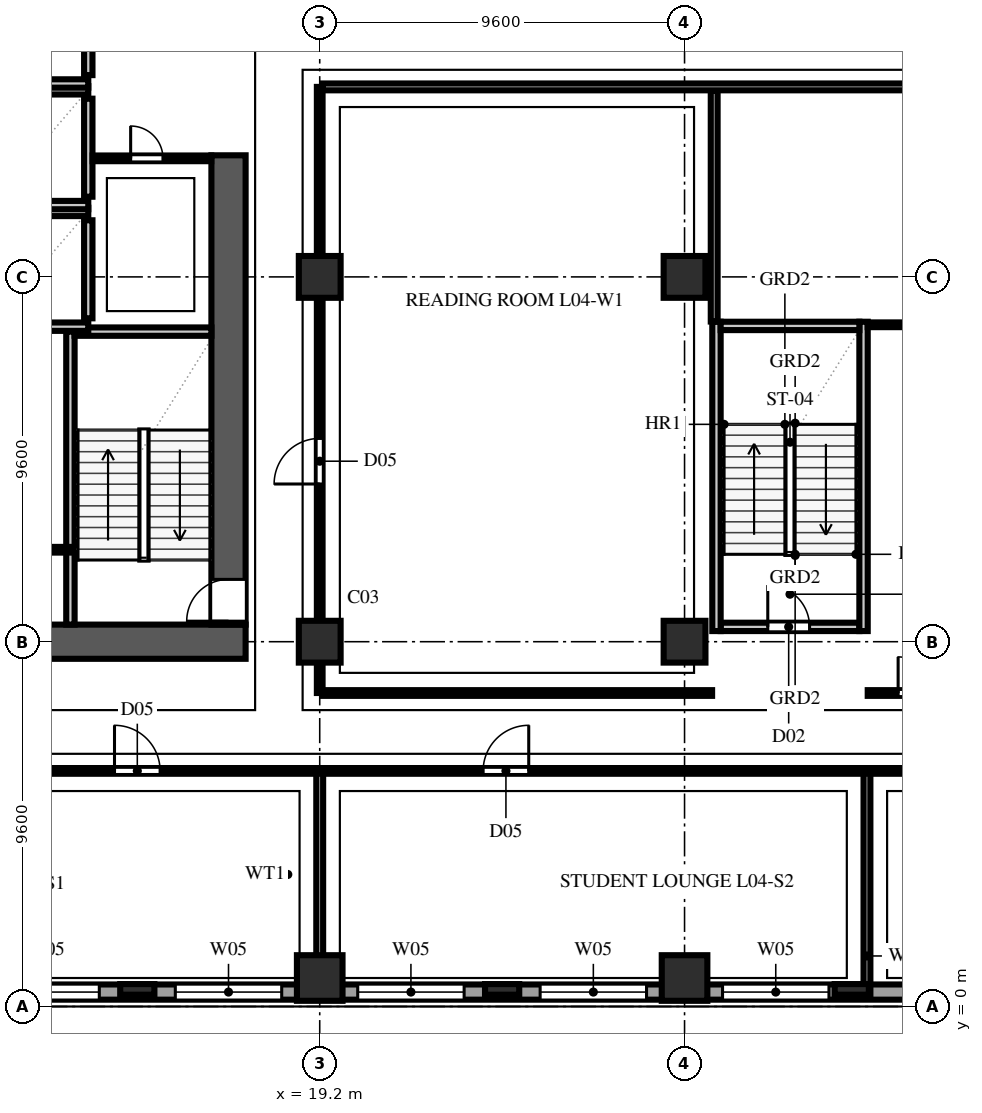
"""IFC4 building model, lengths in metres.
Left out: names, types, materials, properties, quantities, classifications, styles, units other than length and angle.
Written with IfcOpenShell. Run it as: python <this file> out.ifc"""

import sys

from ifc_helpers import new_model, si_unit, direction, frame, frame_2d, origin, origin_2d, place, context, subcontext, project, spatial, rectangle, extrude, element, fill, save


model = new_model("IFC4")
c1 = context("Model", 3, precision=1e-05, world=origin(), true_north=direction((0.0, 1.0)))
c2 = subcontext(c1, "Body", "Model", "MODEL_VIEW")
j1 = project(units=[si_unit("LENGTHUNIT", "METRE"), si_unit("PLANEANGLEUNIT", "RADIAN")], contexts=[c1])
p1 = place(None, origin())
s1 = spatial("IfcSite", under=j1, at=p1, CompositionType="ELEMENT")
p2 = place(p1, origin())
s2 = spatial("IfcBuilding", under=s1, at=p2, CompositionType="ELEMENT")
p3 = place(p2, frame((0.0, 0.0, 19.6)))
s3 = spatial("IfcBuildingStorey", under=s2, at=p3, CompositionType="ELEMENT", Elevation=19.6)
p4 = place(p3, frame((2.65, 9.6, 0.0), z_axis=(0.0, 0.0, 1.0), x_axis=(1.0, 0.0, 0.0)))
e1 = element("IfcWall", 1, at=p4, inside=s3, PredefinedType="SHEAR", context=c2, shape_type="SweptSolid", body=[
    extrude(rectangle(XDim=14.6, YDim=0.9, at=frame_2d((7.3, 0.0))), origin(), (0.0, 0.0, 1.0), 4.34),
])
p5 = place(p3, frame((16.8, 10.05, 0.0), z_axis=(0.0, 0.0, 1.0), x_axis=(0.0, 1.0, 0.0)))
e2 = element("IfcWall", 2, at=p5, inside=s3, PredefinedType="SHEAR", context=c2, shape_type="SweptSolid", body=[
    extrude(rectangle(XDim=12.35, YDim=0.9, at=frame_2d((6.175, 0.0))), origin(), (0.0, 0.0, 1.0), 4.34),
])
p6 = place(p5, frame((0.09, 0.0, 0.0)))
e3 = element("IfcOpeningElement", 3, at=p6, cuts=e2, PredefinedType="OPENING", context=c2, shape_type="SweptSolid", body=[
    extrude(rectangle(XDim=1.1, YDim=2.2, at=frame_2d((0.55, 1.1))), frame((0.0, 0.462, 0.0), z_axis=(0.0, -1.0, 0.0), x_axis=(1.0, 0.0, 0.0)), (0.0, 0.0, 1.0), 0.924),
])
p7 = place(p3, frame((19.2, 0.75, 0.0), z_axis=(0.0, 0.0, 1.0), x_axis=(1.0, 0.0, 0.0)))
e4 = element("IfcColumn", 4, at=p7, inside=s3, PredefinedType="COLUMN", context=c2, shape_type="SweptSolid", body=[
    extrude(rectangle(XDim=1.2, YDim=1.2, at=origin_2d()), origin(), (0.0, 0.0, 1.0), 4.6),
])
for number, where, z_axis, x_axis in (
    (5, (19.2, 9.6, 0.0), (0.0, 0.0, 1.0), (1.0, 0.0, 0.0)),
    (6, (19.2, 19.2, 0.0), (0.0, 0.0, 1.0), (1.0, 0.0, 0.0)),
):
    element("IfcColumn", number, at=place(p3, frame(where, z_axis=z_axis, x_axis=x_axis)), inside=s3, PredefinedType="COLUMN", context=c2, shape_type="SweptSolid", body=[
        extrude(rectangle(XDim=1.1, YDim=1.1, at=origin_2d()), origin(), (0.0, 0.0, 1.0), 4.6),
    ])
p8 = place(p3, frame((28.8, 0.75, 0.0), z_axis=(0.0, 0.0, 1.0), x_axis=(1.0, 0.0, 0.0)))
e7 = element("IfcColumn", 7, at=p8, inside=s3, PredefinedType="COLUMN", context=c2, shape_type="SweptSolid", body=[
    extrude(rectangle(XDim=1.2, YDim=1.2, at=origin_2d()), origin(), (0.0, 0.0, 1.0), 4.6),
])
for number, where, z_axis, x_axis in (
    (8, (28.8, 9.6, 0.0), (0.0, 0.0, 1.0), (1.0, 0.0, 0.0)),
    (9, (28.8, 19.2, 0.0), (0.0, 0.0, 1.0), (1.0, 0.0, 0.0)),
):
    element("IfcColumn", number, at=place(p3, frame(where, z_axis=z_axis, x_axis=x_axis)), inside=s3, PredefinedType="COLUMN", context=c2, shape_type="SweptSolid", body=[
        extrude(rectangle(XDim=1.1, YDim=1.1, at=origin_2d()), origin(), (0.0, 0.0, 1.0), 4.6),
    ])
for number, where, z_axis, x_axis in (
    (10, (14.4, 0.45, 0.0), (0.0, 0.0, 1.0), (1.0, 0.0, 0.0)),
    (11, (24.0, 0.45, 0.0), (0.0, 0.0, 1.0), (1.0, 0.0, 0.0)),
    (12, (33.2, 0.45, 0.0), (0.0, 0.0, 1.0), (1.0, 0.0, 0.0)),
):
    element("IfcColumn", number, at=place(p3, frame(where, z_axis=z_axis, x_axis=x_axis)), inside=s3, PredefinedType="PILASTER", context=c2, shape_type="SweptSolid", body=[
        extrude(rectangle(XDim=0.9, YDim=0.28, at=origin_2d()), origin(), (0.0, 0.0, 1.0), 4.6),
    ])
p9 = place(p3, frame((1.84, 0.38, 0.0), z_axis=(0.0, 0.0, 1.0), x_axis=(1.0, 0.0, 0.0)))
e13 = element("IfcWall", 13, at=p9, inside=s3, PredefinedType="SOLIDWALL", context=c2, shape_type="SweptSolid", body=[
    extrude(rectangle(XDim=63.52, YDim=0.4, at=frame_2d((31.76, 0.0))), origin(), (0.0, 0.0, 1.0), 4.34),
])
p10 = place(p9, frame((3.96, 0.0, 0.75)))
e14 = element("IfcOpeningElement", 14, at=p10, cuts=e13, PredefinedType="OPENING", context=c2, shape_type="SweptSolid", body=[
    extrude(rectangle(XDim=2.8, YDim=2.3, at=frame_2d((1.4, 1.15))), frame((0.0, 0.212, 0.0), z_axis=(0.0, -1.0, 0.0), x_axis=(1.0, 0.0, 0.0)), (0.0, 0.0, 1.0), 0.424),
])
p11 = place(p9, frame((8.76, 0.0, 0.75)))
e15 = element("IfcOpeningElement", 15, at=p11, cuts=e13, PredefinedType="OPENING", context=c2, shape_type="SweptSolid", body=[
    extrude(rectangle(XDim=2.8, YDim=2.3, at=frame_2d((1.4, 1.15))), frame((0.0, 0.212, 0.0), z_axis=(0.0, -1.0, 0.0), x_axis=(1.0, 0.0, 0.0)), (0.0, 0.0, 1.0), 0.424),
])
p12 = place(p9, frame((13.56, 0.0, 0.75)))
e16 = element("IfcOpeningElement", 16, at=p12, cuts=e13, PredefinedType="OPENING", context=c2, shape_type="SweptSolid", body=[
    extrude(rectangle(XDim=2.8, YDim=2.3, at=frame_2d((1.4, 1.15))), frame((0.0, 0.212, 0.0), z_axis=(0.0, -1.0, 0.0), x_axis=(1.0, 0.0, 0.0)), (0.0, 0.0, 1.0), 0.424),
])
p13 = place(p9, frame((18.36, 0.0, 0.75)))
e17 = element("IfcOpeningElement", 17, at=p13, cuts=e13, PredefinedType="OPENING", context=c2, shape_type="SweptSolid", body=[
    extrude(rectangle(XDim=2.8, YDim=2.3, at=frame_2d((1.4, 1.15))), frame((0.0, 0.212, 0.0), z_axis=(0.0, -1.0, 0.0), x_axis=(1.0, 0.0, 0.0)), (0.0, 0.0, 1.0), 0.424),
])
p14 = place(p9, frame((23.16, 0.0, 0.75)))
e18 = element("IfcOpeningElement", 18, at=p14, cuts=e13, PredefinedType="OPENING", context=c2, shape_type="SweptSolid", body=[
    extrude(rectangle(XDim=2.8, YDim=2.3, at=frame_2d((1.4, 1.15))), frame((0.0, 0.212, 0.0), z_axis=(0.0, -1.0, 0.0), x_axis=(1.0, 0.0, 0.0)), (0.0, 0.0, 1.0), 0.424),
])
p15 = place(p9, frame((27.96, 0.0, 0.75)))
e19 = element("IfcOpeningElement", 19, at=p15, cuts=e13, PredefinedType="OPENING", context=c2, shape_type="SweptSolid", body=[
    extrude(rectangle(XDim=2.8, YDim=2.3, at=frame_2d((1.4, 1.15))), frame((0.0, 0.212, 0.0), z_axis=(0.0, -1.0, 0.0), x_axis=(1.0, 0.0, 0.0)), (0.0, 0.0, 1.0), 0.424),
])
p16 = place(p3, frame((12.64, 10.05, 0.0), z_axis=(0.0, 0.0, 1.0), x_axis=(0.0, 1.0, 0.0)))
e20 = element("IfcWall", 20, at=p16, inside=s3, PredefinedType="SOLIDWALL", context=c2, shape_type="SweptSolid", body=[
    extrude(rectangle(XDim=7.71, YDim=0.22, at=frame_2d((3.855, 0.0))), origin(), (0.0, 0.0, 1.0), 4.34),
])
p17 = place(p3, frame((12.75, 17.76, 0.0), z_axis=(0.0, 0.0, 1.0), x_axis=(1.0, 0.0, 0.0)))
e21 = element("IfcWall", 21, at=p17, inside=s3, PredefinedType="SOLIDWALL", context=c2, shape_type="SweptSolid", body=[
    extrude(rectangle(XDim=3.6, YDim=0.22, at=frame_2d((1.8, 0.0))), origin(), (0.0, 0.0, 1.0), 4.34),
])
p18 = place(p3, frame((29.75, 9.99, 0.0), z_axis=(0.0, 0.0, 1.0), x_axis=(1.0, 0.0, 0.0)))
e22 = element("IfcWall", 22, at=p18, inside=s3, PredefinedType="SOLIDWALL", context=c2, shape_type="SweptSolid", body=[
    extrude(rectangle(XDim=3.65, YDim=0.22, at=frame_2d((1.825, 0.0))), origin(), (0.0, 0.0, 1.0), 4.34),
])
p19 = place(p18, frame((1.24, 0.0, 0.0)))
e23 = element("IfcOpeningElement", 23, at=p19, cuts=e22, PredefinedType="OPENING", context=c2, shape_type="SweptSolid", body=[
    extrude(rectangle(XDim=1.1, YDim=2.2, at=frame_2d((0.55, 1.1))), frame((0.0, 0.122, 0.0), z_axis=(0.0, -1.0, 0.0), x_axis=(1.0, 0.0, 0.0)), (0.0, 0.0, 1.0), 0.244),
])
for number, where, z_axis, x_axis in (
    (24, (29.64, 9.88, 0.0), (0.0, 0.0, 1.0), (0.0, 1.0, 0.0)),
    (25, (33.51, 9.88, 0.0), (0.0, 0.0, 1.0), (0.0, 1.0, 0.0)),
):
    element("IfcWall", number, at=place(p3, frame(where, z_axis=z_axis, x_axis=x_axis)), inside=s3, PredefinedType="SOLIDWALL", context=c2, shape_type="SweptSolid", body=[
        extrude(rectangle(XDim=8.14, YDim=0.22, at=frame_2d((4.07, 0.0))), origin(), (0.0, 0.0, 1.0), 4.34),
    ])
p20 = place(p3, frame((29.75, 17.91, 0.0), z_axis=(0.0, 0.0, 1.0), x_axis=(1.0, 0.0, 0.0)))
e26 = element("IfcWall", 26, at=p20, inside=s3, PredefinedType="SOLIDWALL", context=c2, shape_type="SweptSolid", body=[
    extrude(rectangle(XDim=3.65, YDim=0.22, at=frame_2d((1.825, 0.0))), origin(), (0.0, 0.0, 1.0), 4.34),
])
p21 = place(p3, frame((13.11, 18.11, 0.0), z_axis=(0.0, 0.0, 1.0), x_axis=(0.0, 1.0, 0.0)))
e27 = element("IfcWall", 27, at=p21, inside=s3, PredefinedType="SOLIDWALL", context=c2, shape_type="SweptSolid", body=[
    extrude(rectangle(XDim=2.58, YDim=0.22, at=frame_2d((1.29, 0.0))), origin(), (0.0, 0.0, 1.0), 4.34),
])
for number, where, z_axis, x_axis in (
    (28, (10.49, 17.89, 0.0), (0.0, 0.0, 1.0), (1.0, 0.0, 0.0)),
    (29, (10.49, 20.91, 0.0), (0.0, 0.0, 1.0), (1.0, 0.0, 0.0)),
):
    element("IfcWall", number, at=place(p3, frame(where, z_axis=z_axis, x_axis=x_axis)), inside=s3, PredefinedType="SOLIDWALL", context=c2, shape_type="SweptSolid", body=[
        extrude(rectangle(XDim=2.62, YDim=0.22, at=frame_2d((1.31, 0.0))), origin(), (0.0, 0.0, 1.0), 4.34),
    ])
p22 = place(p3, frame((13.11, 21.31, 0.0), z_axis=(0.0, 0.0, 1.0), x_axis=(0.0, 1.0, 0.0)))
e30 = element("IfcWall", 30, at=p22, inside=s3, PredefinedType="SOLIDWALL", context=c2, shape_type="SweptSolid", body=[
    extrude(rectangle(XDim=2.58, YDim=0.22, at=frame_2d((1.29, 0.0))), origin(), (0.0, 0.0, 1.0), 4.34),
])
for number, where, z_axis, x_axis in (
    (31, (10.49, 21.09, 0.0), (0.0, 0.0, 1.0), (1.0, 0.0, 0.0)),
    (32, (10.49, 24.11, 0.0), (0.0, 0.0, 1.0), (1.0, 0.0, 0.0)),
):
    element("IfcWall", number, at=place(p3, frame(where, z_axis=z_axis, x_axis=x_axis)), inside=s3, PredefinedType="SOLIDWALL", context=c2, shape_type="SweptSolid", body=[
        extrude(rectangle(XDim=2.62, YDim=0.22, at=frame_2d((1.31, 0.0))), origin(), (0.0, 0.0, 1.0), 4.34),
    ])
p23 = place(p3, frame((13.11, 24.51, 0.0), z_axis=(0.0, 0.0, 1.0), x_axis=(0.0, 1.0, 0.0)))
e33 = element("IfcWall", 33, at=p23, inside=s3, PredefinedType="SOLIDWALL", context=c2, shape_type="SweptSolid", body=[
    extrude(rectangle(XDim=2.58, YDim=0.22, at=frame_2d((1.29, 0.0))), origin(), (0.0, 0.0, 1.0), 4.34),
])
p24 = place(p3, frame((10.49, 24.29, 0.0), z_axis=(0.0, 0.0, 1.0), x_axis=(1.0, 0.0, 0.0)))
e34 = element("IfcWall", 34, at=p24, inside=s3, PredefinedType="SOLIDWALL", context=c2, shape_type="SweptSolid", body=[
    extrude(rectangle(XDim=2.62, YDim=0.22, at=frame_2d((1.31, 0.0))), origin(), (0.0, 0.0, 1.0), 4.34),
])
p25 = place(p3, frame((10.55, 12.02, 0.0), z_axis=(0.0, 0.0, 1.0), x_axis=(1.0, 0.0, 0.0)))
e35 = element("IfcWall", 35, at=p25, inside=s3, PredefinedType="PARTITIONING", context=c2, shape_type="SweptSolid", body=[
    extrude(rectangle(XDim=2.08, YDim=0.15, at=frame_2d((1.04, 0.0))), origin(), (0.0, 0.0, 1.0), 4.34),
])
p26 = place(p25, frame((0.5, 0.0, 0.0)))
e36 = element("IfcOpeningElement", 36, at=p26, cuts=e35, PredefinedType="OPENING", context=c2, shape_type="SweptSolid", body=[
    extrude(rectangle(XDim=0.85, YDim=2.1, at=frame_2d((0.425, 1.05))), frame((0.0, 0.087, 0.0), z_axis=(0.0, -1.0, 0.0), x_axis=(1.0, 0.0, 0.0)), (0.0, 0.0, 1.0), 0.174),
])
p27 = place(p3, frame((13.225, 22.32, 0.0), z_axis=(0.0, 0.0, 1.0), x_axis=(1.0, 0.0, 0.0)))
e37 = element("IfcWall", 37, at=p27, inside=s3, PredefinedType="PARTITIONING", context=c2, shape_type="SweptSolid", body=[
    extrude(rectangle(XDim=3.12, YDim=0.15, at=frame_2d((1.56, 0.0))), origin(), (0.0, 0.0, 1.0), 4.34),
])
p28 = place(p27, frame((1.0, 0.0, 0.0)))
e38 = element("IfcOpeningElement", 38, at=p28, cuts=e37, PredefinedType="OPENING", context=c2, shape_type="SweptSolid", body=[
    extrude(rectangle(XDim=0.85, YDim=2.1, at=frame_2d((0.425, 1.05))), frame((0.0, 0.087, 0.0), z_axis=(0.0, -1.0, 0.0), x_axis=(1.0, 0.0, 0.0)), (0.0, 0.0, 1.0), 0.174),
])
p29 = place(p3, frame((19.2, 0.22, 0.0), z_axis=(0.0, 0.0, 1.0), x_axis=(0.0, 1.0, 0.0)))
e39 = element("IfcWall", 39, at=p29, inside=s3, PredefinedType="PARTITIONING", context=c2, shape_type="SweptSolid", body=[
    extrude(rectangle(XDim=0.53, YDim=0.18, at=frame_2d((0.265, 0.0))), origin(), (0.0, 0.0, 1.0), 4.34),
])
p30 = place(p3, frame((19.2, 0.75, 0.0), z_axis=(0.0, 0.0, 1.0), x_axis=(0.0, 1.0, 0.0)))
e40 = element("IfcWall", 40, at=p30, inside=s3, PredefinedType="PARTITIONING", context=c2, shape_type="SweptSolid", body=[
    extrude(rectangle(XDim=5.45, YDim=0.18, at=frame_2d((2.725, 0.0))), origin(), (0.0, 0.0, 1.0), 3.724),
])
p31 = place(p3, frame((33.6, 0.22, 0.0), z_axis=(0.0, 0.0, 1.0), x_axis=(0.0, 1.0, 0.0)))
e41 = element("IfcWall", 41, at=p31, inside=s3, PredefinedType="PARTITIONING", context=c2, shape_type="SweptSolid", body=[
    extrude(rectangle(XDim=5.98, YDim=0.18, at=frame_2d((2.99, 0.0))), origin(), (0.0, 0.0, 1.0), 4.34),
])
p32 = place(p3, frame((0.22, 6.2, 0.0), z_axis=(0.0, 0.0, 1.0), x_axis=(1.0, 0.0, 0.0)))
e42 = element("IfcWall", 42, at=p32, inside=s3, PredefinedType="PARTITIONING", context=c2, shape_type="SweptSolid", body=[
    extrude(rectangle(XDim=52.58, YDim=0.15, at=frame_2d((26.29, 0.0))), origin(), (0.0, 0.0, 1.0), 4.34),
])
p33 = place(p32, frame((13.58, 0.0, 0.0)))
e43 = element("IfcOpeningElement", 43, at=p33, cuts=e42, PredefinedType="OPENING", context=c2, shape_type="SweptSolid", body=[
    extrude(rectangle(XDim=1.2, YDim=2.2, at=frame_2d((0.6, 1.1))), frame((0.0, 0.087, 0.0), z_axis=(0.0, -1.0, 0.0), x_axis=(1.0, 0.0, 0.0)), (0.0, 0.0, 1.0), 0.174),
])
p34 = place(p32, frame((23.28, 0.0, 0.0)))
e44 = element("IfcOpeningElement", 44, at=p34, cuts=e42, PredefinedType="OPENING", context=c2, shape_type="SweptSolid", body=[
    extrude(rectangle(XDim=1.2, YDim=2.2, at=frame_2d((0.6, 1.1))), frame((0.0, 0.087, 0.0), z_axis=(0.0, -1.0, 0.0), x_axis=(1.0, 0.0, 0.0)), (0.0, 0.0, 1.0), 0.174),
])
p35 = place(p32, frame((41.18, 0.0, 0.0)))
e45 = element("IfcOpeningElement", 45, at=p35, cuts=e42, PredefinedType="OPENING", context=c2, shape_type="SweptSolid", body=[
    extrude(rectangle(XDim=2.0, YDim=2.3, at=frame_2d((1.0, 1.15))), frame((0.0, 0.087, 0.0), z_axis=(0.0, -1.0, 0.0), x_axis=(1.0, 0.0, 0.0)), (0.0, 0.0, 1.0), 0.174),
])
p36 = place(p3, frame((19.2, 8.25, 0.0), z_axis=(0.0, 0.0, 1.0), x_axis=(0.0, 1.0, 0.0)))
e46 = element("IfcWall", 46, at=p36, inside=s3, PredefinedType="PARTITIONING", context=c2, shape_type="SweptSolid", body=[
    extrude(rectangle(XDim=15.95, YDim=0.15, at=frame_2d((7.975, 0.0))), origin(), (0.0, 0.0, 1.0), 3.724),
])
p37 = place(p36, frame((5.5, 0.0, 0.0)))
e47 = element("IfcOpeningElement", 47, at=p37, cuts=e46, PredefinedType="OPENING", context=c2, shape_type="SweptSolid", body=[
    extrude(rectangle(XDim=1.2, YDim=2.2, at=frame_2d((0.6, 1.1))), frame((0.0, 0.087, 0.0), z_axis=(0.0, -1.0, 0.0), x_axis=(1.0, 0.0, 0.0)), (0.0, 0.0, 1.0), 0.174),
])
p38 = place(p3, frame((29.58, 18.025, 0.0), z_axis=(0.0, 0.0, 1.0), x_axis=(0.0, 1.0, 0.0)))
e48 = element("IfcWall", 48, at=p38, inside=s3, PredefinedType="PARTITIONING", context=c2, shape_type="SweptSolid", body=[
    extrude(rectangle(XDim=6.08, YDim=0.18, at=frame_2d((3.04, 0.0))), origin(), (0.0, 0.0, 1.0), 4.34),
])
p39 = place(p3, frame((19.28, 24.2, 0.0), z_axis=(0.0, 0.0, 1.0), x_axis=(1.0, 0.0, 0.0)))
e49 = element("IfcWall", 49, at=p39, inside=s3, PredefinedType="PARTITIONING", context=c2, shape_type="SweptSolid", body=[
    extrude(rectangle(XDim=31.47, YDim=0.18, at=frame_2d((15.735, 0.0))), origin(), (0.0, 0.0, 1.0), 4.34),
])
p40 = place(p39, frame((22.67, 0.0, 0.0)))
e50 = element("IfcOpeningElement", 50, at=p40, cuts=e49, PredefinedType="OPENING", context=c2, shape_type="SweptSolid", body=[
    extrude(rectangle(XDim=0.95, YDim=2.15, at=frame_2d((0.475, 1.075))), frame((0.0, 0.102, 0.0), z_axis=(0.0, -1.0, 0.0), x_axis=(1.0, 0.0, 0.0)), (0.0, 0.0, 1.0), 0.204),
])
p41 = place(p3, frame((19.28, 8.25, 0.0), z_axis=(0.0, 0.0, 1.0), x_axis=(1.0, 0.0, 0.0)))
e51 = element("IfcWall", 51, at=p41, inside=s3, PredefinedType="PARTITIONING", context=c2, shape_type="SweptSolid", body=[
    extrude(rectangle(XDim=10.245, YDim=0.15, at=frame_2d((5.123, 0.0))), origin(), (0.0, 0.0, 1.0), 4.34),
])
p42 = place(p3, frame((33.62, 17.94, 0.0), z_axis=(0.0, 0.0, 1.0), x_axis=(1.0, 0.0, 0.0)))
e52 = element("IfcWall", 52, at=p42, inside=s3, PredefinedType="PARTITIONING", context=c2, shape_type="SweptSolid", body=[
    extrude(rectangle(XDim=17.13, YDim=0.125, at=frame_2d((8.565, 0.0))), origin(), (0.0, 0.0, 1.0), 4.34),
])
p43 = place(p3, frame((33.62, 8.25, 0.0), z_axis=(0.0, 0.0, 1.0), x_axis=(1.0, 0.0, 0.0)))
e53 = element("IfcWall", 53, at=p43, inside=s3, PredefinedType="PARTITIONING", context=c2, shape_type="SweptSolid", body=[
    extrude(rectangle(XDim=17.13, YDim=0.15, at=frame_2d((8.565, 0.0))), origin(), (0.0, 0.0, 1.0), 4.34),
])
p44 = place(p43, frame((0.8, 0.0, 0.0)))
e54 = element("IfcOpeningElement", 54, at=p44, cuts=e53, PredefinedType="OPENING", context=c2, shape_type="SweptSolid", body=[
    extrude(rectangle(XDim=0.95, YDim=2.15, at=frame_2d((0.475, 1.075))), frame((0.0, 0.087, 0.0), z_axis=(0.0, -1.0, 0.0), x_axis=(1.0, 0.0, 0.0)), (0.0, 0.0, 1.0), 0.174),
])
p45 = place(p11, origin())
e55 = element("IfcWindow", 55, at=p45, inside=s3, PartitioningType="TRIPLE_PANEL_VERTICAL", PredefinedType="WINDOW", context=c2, shape_type="SweptSolid", body=[
    extrude(rectangle(XDim=2.8, YDim=2.3, at=frame_2d((1.4, 1.15))), frame((0.0, 0.11, 0.0), z_axis=(0.0, -1.0, 0.0), x_axis=(1.0, 0.0, 0.0)), (0.0, 0.0, 1.0), 0.06),
])
fill(e15, e55)
p46 = place(p12, origin())
e56 = element("IfcWindow", 56, at=p46, inside=s3, PartitioningType="TRIPLE_PANEL_VERTICAL", PredefinedType="WINDOW", context=c2, shape_type="SweptSolid", body=[
    extrude(rectangle(XDim=2.8, YDim=2.3, at=frame_2d((1.4, 1.15))), frame((0.0, 0.11, 0.0), z_axis=(0.0, -1.0, 0.0), x_axis=(1.0, 0.0, 0.0)), (0.0, 0.0, 1.0), 0.06),
])
fill(e16, e56)
p47 = place(p13, origin())
e57 = element("IfcWindow", 57, at=p47, inside=s3, PartitioningType="TRIPLE_PANEL_VERTICAL", PredefinedType="WINDOW", context=c2, shape_type="SweptSolid", body=[
    extrude(rectangle(XDim=2.8, YDim=2.3, at=frame_2d((1.4, 1.15))), frame((0.0, 0.11, 0.0), z_axis=(0.0, -1.0, 0.0), x_axis=(1.0, 0.0, 0.0)), (0.0, 0.0, 1.0), 0.06),
])
fill(e17, e57)
p48 = place(p14, origin())
e58 = element("IfcWindow", 58, at=p48, inside=s3, PartitioningType="TRIPLE_PANEL_VERTICAL", PredefinedType="WINDOW", context=c2, shape_type="SweptSolid", body=[
    extrude(rectangle(XDim=2.8, YDim=2.3, at=frame_2d((1.4, 1.15))), frame((0.0, 0.11, 0.0), z_axis=(0.0, -1.0, 0.0), x_axis=(1.0, 0.0, 0.0)), (0.0, 0.0, 1.0), 0.06),
])
fill(e18, e58)
p49 = place(p15, origin())
e59 = element("IfcWindow", 59, at=p49, inside=s3, PartitioningType="TRIPLE_PANEL_VERTICAL", PredefinedType="WINDOW", context=c2, shape_type="SweptSolid", body=[
    extrude(rectangle(XDim=2.8, YDim=2.3, at=frame_2d((1.4, 1.15))), frame((0.0, 0.11, 0.0), z_axis=(0.0, -1.0, 0.0), x_axis=(1.0, 0.0, 0.0)), (0.0, 0.0, 1.0), 0.06),
])
fill(e19, e59)
p50 = place(p6, origin())
e60 = element("IfcDoor", 60, at=p50, inside=s3, OperationType="SINGLE_SWING_LEFT", PredefinedType="DOOR", context=c2, shape_type="SweptSolid", body=[
    extrude(rectangle(XDim=1.1, YDim=2.2, at=frame_2d((0.55, 1.1))), frame((0.0, 0.025, 0.0), z_axis=(0.0, -1.0, 0.0), x_axis=(1.0, 0.0, 0.0)), (0.0, 0.0, 1.0), 0.05),
])
fill(e3, e60)
p51 = place(p19, origin())
e61 = element("IfcDoor", 61, at=p51, inside=s3, OperationType="SINGLE_SWING_LEFT", PredefinedType="DOOR", context=c2, shape_type="SweptSolid", body=[
    extrude(rectangle(XDim=1.1, YDim=2.2, at=frame_2d((0.55, 1.1))), frame((0.0, 0.025, 0.0), z_axis=(0.0, -1.0, 0.0), x_axis=(1.0, 0.0, 0.0)), (0.0, 0.0, 1.0), 0.05),
])
fill(e23, e61)
p52 = place(p28, origin())
e62 = element("IfcDoor", 62, at=p52, inside=s3, OperationType="SINGLE_SWING_LEFT", PredefinedType="DOOR", context=c2, shape_type="SweptSolid", body=[
    extrude(rectangle(XDim=0.85, YDim=2.1, at=frame_2d((0.425, 1.05))), frame((0.0, 0.025, 0.0), z_axis=(0.0, -1.0, 0.0), x_axis=(1.0, 0.0, 0.0)), (0.0, 0.0, 1.0), 0.05),
])
fill(e38, e62)
p53 = place(p33, origin())
e63 = element("IfcDoor", 63, at=p53, inside=s3, OperationType="SINGLE_SWING_LEFT", PredefinedType="DOOR", context=c2, shape_type="SweptSolid", body=[
    extrude(rectangle(XDim=1.2, YDim=2.2, at=frame_2d((0.6, 1.1))), frame((0.0, 0.025, 0.0), z_axis=(0.0, -1.0, 0.0), x_axis=(1.0, 0.0, 0.0)), (0.0, 0.0, 1.0), 0.05),
])
fill(e43, e63)
p54 = place(p34, origin())
e64 = element("IfcDoor", 64, at=p54, inside=s3, OperationType="SINGLE_SWING_RIGHT", PredefinedType="DOOR", context=c2, shape_type="SweptSolid", body=[
    extrude(rectangle(XDim=1.2, YDim=2.2, at=frame_2d((0.6, 1.1))), frame((0.0, 0.025, 0.0), z_axis=(0.0, -1.0, 0.0), x_axis=(1.0, 0.0, 0.0)), (0.0, 0.0, 1.0), 0.05),
])
fill(e44, e64)
p55 = place(p37, origin())
e65 = element("IfcDoor", 65, at=p55, inside=s3, OperationType="SINGLE_SWING_LEFT", PredefinedType="DOOR", context=c2, shape_type="SweptSolid", body=[
    extrude(rectangle(XDim=1.2, YDim=2.2, at=frame_2d((0.6, 1.1))), frame((0.0, 0.025, 0.0), z_axis=(0.0, -1.0, 0.0), x_axis=(1.0, 0.0, 0.0)), (0.0, 0.0, 1.0), 0.05),
])
fill(e47, e65)
p56 = place(p44, origin())
e66 = element("IfcDoor", 66, at=p56, inside=s3, OperationType="SINGLE_SWING_LEFT", PredefinedType="DOOR", context=c2, shape_type="SweptSolid", body=[
    extrude(rectangle(XDim=0.95, YDim=2.15, at=frame_2d((0.475, 1.075))), frame((0.0, 0.025, 0.0), z_axis=(0.0, -1.0, 0.0), x_axis=(1.0, 0.0, 0.0)), (0.0, 0.0, 1.0), 0.05),
])
fill(e54, e66)
save(model, sys.argv[1])
